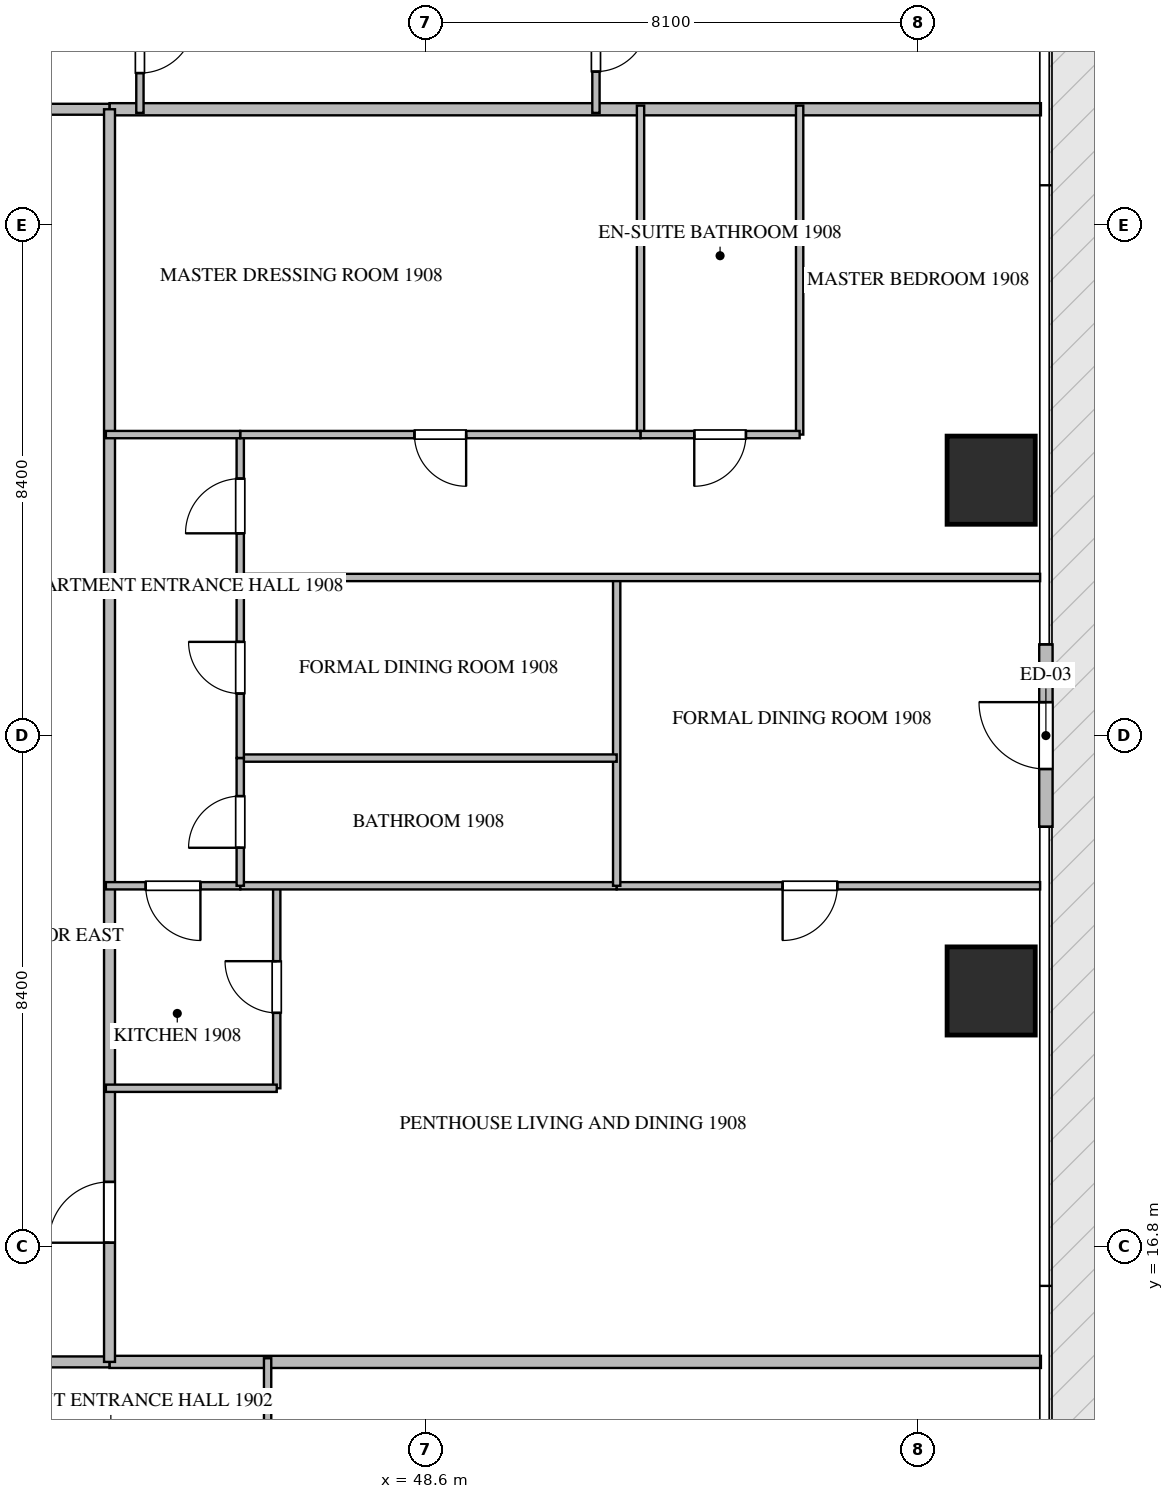
"""IFC4 building model, lengths in metres.
Left out: names, types, materials, properties, quantities, classifications, styles, units other than length and angle.
Written with IfcOpenShell. Run it as: python <this file> out.ifc"""

import sys

from ifc_helpers import new_model, si_unit, direction, frame, frame_2d, origin, origin_2d, place, context, subcontext, project, spatial, rectangle, extrude, source, transform, mapped, element, fill, save


model = new_model("IFC4")
c1 = context("Model", 3, precision=1e-05, world=origin(), true_north=direction((0.0, 1.0)))
c2 = subcontext(c1, "Body", "Model", "MODEL_VIEW")
j1 = project(units=[si_unit("LENGTHUNIT", "METRE"), si_unit("PLANEANGLEUNIT", "RADIAN")], contexts=[c1])
p1 = place(None, origin())
s1 = spatial("IfcSite", under=j1, at=p1, CompositionType="ELEMENT")
p2 = place(p1, origin())
s2 = spatial("IfcBuilding", under=s1, at=p2, CompositionType="ELEMENT")
p3 = place(p2, frame((0.0, 0.0, 79.2)))
s3 = spatial("IfcBuildingStorey", under=s2, at=p3, CompositionType="ELEMENT", Elevation=79.2)
m1 = source(origin(), c2, "Body", "SweptSolid", [
    extrude(rectangle(XDim=1.45, YDim=1.45, at=origin_2d()), origin(), (0.0, 0.0, 1.0), 3.75),
])
for number, where, z_axis, x_axis in (
    (1, (57.9, 21.0, -0.26), (0.0, 0.0, 1.0), (1.0, 0.0, 0.0)),
    (2, (57.9, 29.4, -0.26), (0.0, 0.0, 1.0), (1.0, 0.0, 0.0)),
):
    element("IfcColumn", number, at=place(p3, frame(where, z_axis=z_axis, x_axis=x_axis)), inside=s3, PredefinedType="COLUMN", context=c2, shape_type="MappedRepresentation", body=[
        mapped(m1, transform((0.0, 0.0, 0.0), scale=1.0)),
    ])
p4 = place(p3, frame((58.8, 23.7, 0.0), z_axis=(0.0, 0.0, 1.0), x_axis=(0.0, 1.0, 0.0)))
e3 = element("IfcWall", 3, at=p4, inside=s3, PredefinedType="ELEMENTEDWALL", context=c2, shape_type="SweptSolid", body=[
    extrude(rectangle(XDim=3.0, YDim=0.22, at=frame_2d((1.5, 0.0))), origin(), (0.0, 0.0, 1.0), 3.475),
])
p5 = place(p4, frame((0.95, 0.0, 0.0)))
e4 = element("IfcOpeningElement", 4, at=p5, cuts=e3, PredefinedType="OPENING", context=c2, shape_type="SweptSolid", body=[
    extrude(rectangle(XDim=1.1, YDim=2.2, at=frame_2d((0.55, 1.1))), frame((0.0, 0.12, 0.0), z_axis=(0.0, -1.0, 0.0), x_axis=(1.0, 0.0, 0.0)), (0.0, 0.0, 1.0), 0.24),
])
for number, where, z_axis, x_axis in (
    (5, (43.4, 14.9, 0.0), (0.0, 0.0, 1.0), (1.0, 0.0, 0.0)),
    (6, (43.4, 35.5, 0.0), (0.0, 0.0, 1.0), (1.0, 0.0, 0.0)),
):
    element("IfcWall", number, at=place(p3, frame(where, z_axis=z_axis, x_axis=x_axis)), inside=s3, PredefinedType="PARTITIONING", context=c2, shape_type="SweptSolid", body=[
        extrude(rectangle(XDim=15.318, YDim=0.2, at=frame_2d((7.659, 0.0))), origin(), (0.0, 0.0, 1.0), 3.49),
    ])
p6 = place(p3, frame((21.402, 14.9, 0.0), z_axis=(0.0, 0.0, 1.0), x_axis=(1.0, 0.0, 0.0)))
e7 = element("IfcWall", 7, at=p6, inside=s3, PredefinedType="PARTITIONING", context=c2, shape_type="SweptSolid", body=[
    extrude(rectangle(XDim=21.996, YDim=0.18, at=frame_2d((10.998, 0.0))), origin(), (0.0, 0.0, 1.0), 3.49),
])
p7 = place(p6, frame((4.724, 0.0, 0.0)))
e8 = element("IfcOpeningElement", 8, at=p7, cuts=e7, PredefinedType="OPENING", context=c2, shape_type="SweptSolid", body=[
    extrude(rectangle(XDim=1.0, YDim=2.15, at=frame_2d((0.5, 1.075))), frame((0.0, 0.1, 0.0), z_axis=(0.0, -1.0, 0.0), x_axis=(1.0, 0.0, 0.0)), (0.0, 0.0, 1.0), 0.2),
])
p8 = place(p6, frame((10.498, 0.0, 0.0)))
e9 = element("IfcOpeningElement", 9, at=p8, cuts=e7, PredefinedType="OPENING", context=c2, shape_type="SweptSolid", body=[
    extrude(rectangle(XDim=1.0, YDim=2.15, at=frame_2d((0.5, 1.075))), frame((0.0, 0.1, 0.0), z_axis=(0.0, -1.0, 0.0), x_axis=(1.0, 0.0, 0.0)), (0.0, 0.0, 1.0), 0.2),
])
p9 = place(p3, frame((21.402, 35.5, 0.0), z_axis=(0.0, 0.0, 1.0), x_axis=(1.0, 0.0, 0.0)))
e10 = element("IfcWall", 10, at=p9, inside=s3, PredefinedType="PARTITIONING", context=c2, shape_type="SweptSolid", body=[
    extrude(rectangle(XDim=21.996, YDim=0.18, at=frame_2d((10.998, 0.0))), origin(), (0.0, 0.0, 1.0), 3.49),
])
p10 = place(p9, frame((10.498, 0.0, 0.0)))
e11 = element("IfcOpeningElement", 11, at=p10, cuts=e10, PredefinedType="OPENING", context=c2, shape_type="SweptSolid", body=[
    extrude(rectangle(XDim=1.0, YDim=2.15, at=frame_2d((0.5, 1.075))), frame((0.0, 0.1, 0.0), z_axis=(0.0, -1.0, 0.0), x_axis=(1.0, 0.0, 0.0)), (0.0, 0.0, 1.0), 0.2),
])
p11 = place(p9, frame((16.272, 0.0, 0.0)))
e12 = element("IfcOpeningElement", 12, at=p11, cuts=e10, PredefinedType="OPENING", context=c2, shape_type="SweptSolid", body=[
    extrude(rectangle(XDim=1.0, YDim=2.15, at=frame_2d((0.5, 1.075))), frame((0.0, 0.1, 0.0), z_axis=(0.0, -1.0, 0.0), x_axis=(1.0, 0.0, 0.0)), (0.0, 0.0, 1.0), 0.2),
])
p12 = place(p3, frame((43.4, 14.9, 0.0), z_axis=(0.0, 0.0, 1.0), x_axis=(0.0, 1.0, 0.0)))
e13 = element("IfcWall", 13, at=p12, inside=s3, PredefinedType="PARTITIONING", context=c2, shape_type="SweptSolid", body=[
    extrude(rectangle(XDim=20.6, YDim=0.18, at=frame_2d((10.3, 0.0))), origin(), (0.0, 0.0, 1.0), 3.49),
])
p13 = place(p12, frame((1.96, 0.0, 0.0)))
e14 = element("IfcOpeningElement", 14, at=p13, cuts=e13, PredefinedType="OPENING", context=c2, shape_type="SweptSolid", body=[
    extrude(rectangle(XDim=1.0, YDim=2.15, at=frame_2d((0.5, 1.075))), frame((0.0, 0.1, 0.0), z_axis=(0.0, -1.0, 0.0), x_axis=(1.0, 0.0, 0.0)), (0.0, 0.0, 1.0), 0.2),
])
p14 = place(p3, frame((46.0, 12.752, 0.0), z_axis=(0.0, 0.0, 1.0), x_axis=(0.0, 1.0, 0.0)))
e15 = element("IfcWall", 15, at=p14, inside=s3, PredefinedType="PARTITIONING", context=c2, shape_type="SweptSolid", body=[
    extrude(rectangle(XDim=2.208, YDim=0.12, at=frame_2d((1.104, 0.0))), origin(), (0.0, 0.0, 1.0), 3.49),
])
p15 = place(p3, frame((43.9, 37.65, 0.0), z_axis=(0.0, 0.0, 1.0), x_axis=(0.0, -1.0, 0.0)))
e16 = element("IfcWall", 16, at=p15, inside=s3, PredefinedType="PARTITIONING", context=c2, shape_type="SweptSolid", body=[
    extrude(rectangle(XDim=2.21, YDim=0.12, at=frame_2d((1.105, 0.0))), origin(), (0.0, 0.0, 1.0), 3.49),
])
p16 = place(p15, frame((0.655, 0.0, 0.0)))
e17 = element("IfcOpeningElement", 17, at=p16, cuts=e16, PredefinedType="OPENING", context=c2, shape_type="SweptSolid", body=[
    extrude(rectangle(XDim=0.9, YDim=2.1, at=frame_2d((0.45, 1.05))), frame((0.0, 0.07, 0.0), z_axis=(0.0, -1.0, 0.0), x_axis=(1.0, 0.0, 0.0)), (0.0, 0.0, 1.0), 0.14),
])
p17 = place(p3, frame((51.4, 37.648, 0.0), z_axis=(0.0, 0.0, 1.0), x_axis=(0.0, -1.0, 0.0)))
e18 = element("IfcWall", 18, at=p17, inside=s3, PredefinedType="PARTITIONING", context=c2, shape_type="SweptSolid", body=[
    extrude(rectangle(XDim=2.208, YDim=0.12, at=frame_2d((1.104, 0.0))), origin(), (0.0, 0.0, 1.0), 3.49),
])
p18 = place(p17, frame((0.679, 0.0, 0.0)))
e19 = element("IfcOpeningElement", 19, at=p18, cuts=e18, PredefinedType="OPENING", context=c2, shape_type="SweptSolid", body=[
    extrude(rectangle(XDim=0.85, YDim=2.1, at=frame_2d((0.425, 1.05))), frame((0.0, 0.07, 0.0), z_axis=(0.0, -1.0, 0.0), x_axis=(1.0, 0.0, 0.0)), (0.0, 0.0, 1.0), 0.14),
])
p19 = place(p3, frame((46.15, 19.4, 0.0), z_axis=(0.0, 0.0, 1.0), x_axis=(0.0, 1.0, 0.0)))
e20 = element("IfcWall", 20, at=p19, inside=s3, PredefinedType="PARTITIONING", context=c2, shape_type="SweptSolid", body=[
    extrude(rectangle(XDim=3.33, YDim=0.12, at=frame_2d((1.665, 0.0))), origin(), (0.0, 0.0, 1.0), 3.49),
])
p20 = place(p19, frame((1.24, 0.0, 0.0)))
e21 = element("IfcOpeningElement", 21, at=p20, cuts=e20, PredefinedType="OPENING", context=c2, shape_type="SweptSolid", body=[
    extrude(rectangle(XDim=0.85, YDim=2.1, at=frame_2d((0.425, 1.05))), frame((0.0, 0.07, 0.0), z_axis=(0.0, -1.0, 0.0), x_axis=(1.0, 0.0, 0.0)), (0.0, 0.0, 1.0), 0.14),
])
p21 = place(p3, frame((46.15, 19.4, 0.0), z_axis=(0.0, 0.0, 1.0), x_axis=(-1.0, 0.0, 0.0)))
e22 = element("IfcWall", 22, at=p21, inside=s3, PredefinedType="PARTITIONING", context=c2, shape_type="SweptSolid", body=[
    extrude(rectangle(XDim=2.81, YDim=0.12, at=frame_2d((1.405, 0.0))), origin(), (0.0, 0.0, 1.0), 3.49),
])
p22 = place(p3, frame((45.55, 22.73, 0.0), z_axis=(0.0, 0.0, 1.0), x_axis=(-1.0, 0.0, 0.0)))
e23 = element("IfcWall", 23, at=p22, inside=s3, PredefinedType="PARTITIONING", context=c2, shape_type="SweptSolid", body=[
    extrude(rectangle(XDim=2.21, YDim=0.12, at=frame_2d((1.105, 0.0))), origin(), (0.0, 0.0, 1.0), 3.49),
])
p23 = place(p22, frame((0.655, 0.0, 0.0)))
e24 = element("IfcOpeningElement", 24, at=p23, cuts=e23, PredefinedType="OPENING", context=c2, shape_type="SweptSolid", body=[
    extrude(rectangle(XDim=0.9, YDim=2.1, at=frame_2d((0.45, 1.05))), frame((0.0, 0.07, 0.0), z_axis=(0.0, -1.0, 0.0), x_axis=(1.0, 0.0, 0.0)), (0.0, 0.0, 1.0), 0.14),
])
p24 = place(p3, frame((58.705, 22.73, 0.0), z_axis=(0.0, 0.0, 1.0), x_axis=(-1.0, 0.0, 0.0)))
e25 = element("IfcWall", 25, at=p24, inside=s3, PredefinedType="PARTITIONING", context=c2, shape_type="SweptSolid", body=[
    extrude(rectangle(XDim=6.964, YDim=0.12, at=frame_2d((3.482, 0.0))), origin(), (0.0, 0.0, 1.0), 3.49),
])
p25 = place(p24, frame((3.335, 0.0, 0.0)))
e26 = element("IfcOpeningElement", 26, at=p25, cuts=e25, PredefinedType="OPENING", context=c2, shape_type="SweptSolid", body=[
    extrude(rectangle(XDim=0.9, YDim=2.1, at=frame_2d((0.45, 1.05))), frame((0.0, 0.07, 0.0), z_axis=(0.0, -1.0, 0.0), x_axis=(1.0, 0.0, 0.0)), (0.0, 0.0, 1.0), 0.14),
])
p26 = place(p3, frame((51.739, 22.73, 0.0), z_axis=(0.0, 0.0, 1.0), x_axis=(-1.0, 0.0, 0.0)))
e27 = element("IfcWall", 27, at=p26, inside=s3, PredefinedType="PARTITIONING", context=c2, shape_type="SweptSolid", body=[
    extrude(rectangle(XDim=6.187, YDim=0.12, at=frame_2d((3.094, 0.0))), origin(), (0.0, 0.0, 1.0), 3.49),
])
p27 = place(p3, frame((51.741, 22.73, 0.0), z_axis=(0.0, 0.0, 1.0), x_axis=(0.0, 1.0, 0.0)))
e28 = element("IfcWall", 28, at=p27, inside=s3, PredefinedType="PARTITIONING", context=c2, shape_type="SweptSolid", body=[
    extrude(rectangle(XDim=5.07, YDim=0.12, at=frame_2d((2.535, 0.0))), origin(), (0.0, 0.0, 1.0), 3.49),
])
p28 = place(p3, frame((58.705, 27.8, 0.0), z_axis=(0.0, 0.0, 1.0), x_axis=(-1.0, 0.0, 0.0)))
e29 = element("IfcWall", 29, at=p28, inside=s3, PredefinedType="PARTITIONING", context=c2, shape_type="SweptSolid", body=[
    extrude(rectangle(XDim=13.155, YDim=0.12, at=frame_2d((6.578, 0.0))), origin(), (0.0, 0.0, 1.0), 3.49),
])
p29 = place(p3, frame((51.741, 24.83, 0.0), z_axis=(0.0, 0.0, 1.0), x_axis=(-1.0, 0.0, 0.0)))
e30 = element("IfcWall", 30, at=p29, inside=s3, PredefinedType="PARTITIONING", context=c2, shape_type="SweptSolid", body=[
    extrude(rectangle(XDim=6.191, YDim=0.12, at=frame_2d((3.095, 0.0))), origin(), (0.0, 0.0, 1.0), 3.49),
])
p30 = place(p3, frame((45.55, 22.73, 0.0), z_axis=(0.0, 0.0, 1.0), x_axis=(0.0, 1.0, 0.0)))
e31 = element("IfcWall", 31, at=p30, inside=s3, PredefinedType="PARTITIONING", context=c2, shape_type="SweptSolid", body=[
    extrude(rectangle(XDim=2.1, YDim=0.12, at=frame_2d((1.05, 0.0))), origin(), (0.0, 0.0, 1.0), 3.49),
])
p31 = place(p30, frame((0.625, 0.0, 0.0)))
e32 = element("IfcOpeningElement", 32, at=p31, cuts=e31, PredefinedType="OPENING", context=c2, shape_type="SweptSolid", body=[
    extrude(rectangle(XDim=0.85, YDim=2.1, at=frame_2d((0.425, 1.05))), frame((0.0, 0.07, 0.0), z_axis=(0.0, -1.0, 0.0), x_axis=(1.0, 0.0, 0.0)), (0.0, 0.0, 1.0), 0.14),
])
p32 = place(p3, frame((45.55, 24.832, 0.0), z_axis=(0.0, 0.0, 1.0), x_axis=(0.0, 1.0, 0.0)))
e33 = element("IfcWall", 33, at=p32, inside=s3, PredefinedType="PARTITIONING", context=c2, shape_type="SweptSolid", body=[
    extrude(rectangle(XDim=2.968, YDim=0.12, at=frame_2d((1.484, 0.0))), origin(), (0.0, 0.0, 1.0), 3.49),
])
p33 = place(p32, frame((1.059, 0.0, 0.0)))
e34 = element("IfcOpeningElement", 34, at=p33, cuts=e33, PredefinedType="OPENING", context=c2, shape_type="SweptSolid", body=[
    extrude(rectangle(XDim=0.85, YDim=2.1, at=frame_2d((0.425, 1.05))), frame((0.0, 0.07, 0.0), z_axis=(0.0, -1.0, 0.0), x_axis=(1.0, 0.0, 0.0)), (0.0, 0.0, 1.0), 0.14),
])
p34 = place(p3, frame((45.55, 27.802, 0.0), z_axis=(0.0, 0.0, 1.0), x_axis=(0.0, 1.0, 0.0)))
e35 = element("IfcWall", 35, at=p34, inside=s3, PredefinedType="PARTITIONING", context=c2, shape_type="SweptSolid", body=[
    extrude(rectangle(XDim=2.348, YDim=0.12, at=frame_2d((1.174, 0.0))), origin(), (0.0, 0.0, 1.0), 3.49),
])
p35 = place(p34, frame((0.724, 0.0, 0.0)))
e36 = element("IfcOpeningElement", 36, at=p35, cuts=e35, PredefinedType="OPENING", context=c2, shape_type="SweptSolid", body=[
    extrude(rectangle(XDim=0.9, YDim=2.1, at=frame_2d((0.45, 1.05))), frame((0.0, 0.07, 0.0), z_axis=(0.0, -1.0, 0.0), x_axis=(1.0, 0.0, 0.0)), (0.0, 0.0, 1.0), 0.14),
])
for number, where, z_axis, x_axis in (
    (37, (54.75, 30.15, 0.0), (0.0, 0.0, 1.0), (0.0, 1.0, 0.0)),
    (38, (52.133, 30.15, 0.0), (0.0, 0.0, 1.0), (0.0, 1.0, 0.0)),
):
    element("IfcWall", number, at=place(p3, frame(where, z_axis=z_axis, x_axis=x_axis)), inside=s3, PredefinedType="PARTITIONING", context=c2, shape_type="SweptSolid", body=[
        extrude(rectangle(XDim=5.41, YDim=0.12, at=frame_2d((2.705, 0.0))), origin(), (0.0, 0.0, 1.0), 3.49),
    ])
p36 = place(p3, frame((54.75, 30.15, 0.0), z_axis=(0.0, 0.0, 1.0), x_axis=(-1.0, 0.0, 0.0)))
e39 = element("IfcWall", 39, at=p36, inside=s3, PredefinedType="PARTITIONING", context=c2, shape_type="SweptSolid", body=[
    extrude(rectangle(XDim=2.617, YDim=0.12, at=frame_2d((1.309, 0.0))), origin(), (0.0, 0.0, 1.0), 3.49),
])
p37 = place(p36, frame((0.883, 0.0, 0.0)))
e40 = element("IfcOpeningElement", 40, at=p37, cuts=e39, PredefinedType="OPENING", context=c2, shape_type="SweptSolid", body=[
    extrude(rectangle(XDim=0.85, YDim=2.1, at=frame_2d((0.425, 1.05))), frame((0.0, 0.07, 0.0), z_axis=(0.0, -1.0, 0.0), x_axis=(1.0, 0.0, 0.0)), (0.0, 0.0, 1.0), 0.14),
])
p38 = place(p3, frame((52.131, 30.15, 0.0), z_axis=(0.0, 0.0, 1.0), x_axis=(-1.0, 0.0, 0.0)))
e41 = element("IfcWall", 41, at=p38, inside=s3, PredefinedType="PARTITIONING", context=c2, shape_type="SweptSolid", body=[
    extrude(rectangle(XDim=6.581, YDim=0.12, at=frame_2d((3.291, 0.0))), origin(), (0.0, 0.0, 1.0), 3.49),
])
p39 = place(p38, frame((2.866, 0.0, 0.0)))
e42 = element("IfcOpeningElement", 42, at=p39, cuts=e41, PredefinedType="OPENING", context=c2, shape_type="SweptSolid", body=[
    extrude(rectangle(XDim=0.85, YDim=2.1, at=frame_2d((0.425, 1.05))), frame((0.0, 0.07, 0.0), z_axis=(0.0, -1.0, 0.0), x_axis=(1.0, 0.0, 0.0)), (0.0, 0.0, 1.0), 0.14),
])
p40 = place(p3, frame((45.548, 30.15, 0.0), z_axis=(0.0, 0.0, 1.0), x_axis=(-1.0, 0.0, 0.0)))
e43 = element("IfcWall", 43, at=p40, inside=s3, PredefinedType="PARTITIONING", context=c2, shape_type="SweptSolid", body=[
    extrude(rectangle(XDim=2.208, YDim=0.12, at=frame_2d((1.104, 0.0))), origin(), (0.0, 0.0, 1.0), 3.49),
])
m2 = source(origin(), c2, "Body", "SweptSolid", [
    extrude(rectangle(XDim=1.1, YDim=2.2, at=frame_2d((0.55, 1.1))), frame((0.0, 0.025, 0.0), z_axis=(0.0, -1.0, 0.0), x_axis=(1.0, 0.0, 0.0)), (0.0, 0.0, 1.0), 0.05),
])
p41 = place(p5, origin())
e44 = element("IfcDoor", 44, at=p41, inside=s3, OperationType="SINGLE_SWING_RIGHT", PredefinedType="DOOR", context=c2, shape_type="MappedRepresentation", body=[
    mapped(m2, transform((0.0, 0.0, 0.0), scale=1.0)),
])
fill(e4, e44)
m3 = source(origin(), c2, "Body", "SweptSolid", [
    extrude(rectangle(XDim=1.0, YDim=2.15, at=frame_2d((0.5, 1.075))), frame((0.0, 0.025, 0.0), z_axis=(0.0, -1.0, 0.0), x_axis=(1.0, 0.0, 0.0)), (0.0, 0.0, 1.0), 0.05),
])
p42 = place(p13, origin())
e45 = element("IfcDoor", 45, at=p42, inside=s3, OperationType="SINGLE_SWING_LEFT", PredefinedType="DOOR", context=c2, shape_type="MappedRepresentation", body=[
    mapped(m3, transform((0.0, 0.0, 0.0), scale=1.0)),
])
fill(e14, e45)
m4 = source(origin(), c2, "Body", "SweptSolid", [
    extrude(rectangle(XDim=0.9, YDim=2.1, at=frame_2d((0.45, 1.05))), frame((0.0, 0.025, 0.0), z_axis=(0.0, -1.0, 0.0), x_axis=(1.0, 0.0, 0.0)), (0.0, 0.0, 1.0), 0.05),
])
p43 = place(p16, origin())
e46 = element("IfcDoor", 46, at=p43, inside=s3, OperationType="SINGLE_SWING_LEFT", PredefinedType="DOOR", context=c2, shape_type="MappedRepresentation", body=[
    mapped(m4, transform((0.0, 0.0, 0.0), scale=1.0)),
])
fill(e17, e46)
m5 = source(origin(), c2, "Body", "SweptSolid", [
    extrude(rectangle(XDim=0.85, YDim=2.1, at=frame_2d((0.425, 1.05))), frame((0.0, 0.025, 0.0), z_axis=(0.0, -1.0, 0.0), x_axis=(1.0, 0.0, 0.0)), (0.0, 0.0, 1.0), 0.05),
])
p44 = place(p18, origin())
e47 = element("IfcDoor", 47, at=p44, inside=s3, OperationType="SINGLE_SWING_LEFT", PredefinedType="DOOR", context=c2, shape_type="MappedRepresentation", body=[
    mapped(m5, transform((0.0, 0.0, 0.0), scale=1.0)),
])
fill(e19, e47)
p45 = place(p20, origin())
e48 = element("IfcDoor", 48, at=p45, inside=s3, OperationType="SINGLE_SWING_RIGHT", PredefinedType="DOOR", context=c2, shape_type="MappedRepresentation", body=[
    mapped(m5, transform((0.0, 0.0, 0.0), scale=1.0)),
])
fill(e21, e48)
p46 = place(p23, origin())
e49 = element("IfcDoor", 49, at=p46, inside=s3, OperationType="SINGLE_SWING_LEFT", PredefinedType="DOOR", context=c2, shape_type="MappedRepresentation", body=[
    mapped(m4, transform((0.0, 0.0, 0.0), scale=1.0)),
])
fill(e24, e49)
p47 = place(p25, origin())
e50 = element("IfcDoor", 50, at=p47, inside=s3, OperationType="SINGLE_SWING_RIGHT", PredefinedType="DOOR", context=c2, shape_type="MappedRepresentation", body=[
    mapped(m4, transform((0.0, 0.0, 0.0), scale=1.0)),
])
fill(e26, e50)
p48 = place(p31, origin())
e51 = element("IfcDoor", 51, at=p48, inside=s3, OperationType="SINGLE_SWING_LEFT", PredefinedType="DOOR", context=c2, shape_type="MappedRepresentation", body=[
    mapped(m5, transform((0.0, 0.0, 0.0), scale=1.0)),
])
fill(e32, e51)
p49 = place(p33, origin())
e52 = element("IfcDoor", 52, at=p49, inside=s3, OperationType="SINGLE_SWING_RIGHT", PredefinedType="DOOR", context=c2, shape_type="MappedRepresentation", body=[
    mapped(m5, transform((0.0, 0.0, 0.0), scale=1.0)),
])
fill(e34, e52)
p50 = place(p35, origin())
e53 = element("IfcDoor", 53, at=p50, inside=s3, OperationType="SINGLE_SWING_LEFT", PredefinedType="DOOR", context=c2, shape_type="MappedRepresentation", body=[
    mapped(m4, transform((0.0, 0.0, 0.0), scale=1.0)),
])
fill(e36, e53)
p51 = place(p37, origin())
e54 = element("IfcDoor", 54, at=p51, inside=s3, OperationType="SINGLE_SWING_RIGHT", PredefinedType="DOOR", context=c2, shape_type="MappedRepresentation", body=[
    mapped(m5, transform((0.0, 0.0, 0.0), scale=1.0)),
])
fill(e40, e54)
p52 = place(p39, origin())
e55 = element("IfcDoor", 55, at=p52, inside=s3, OperationType="SINGLE_SWING_LEFT", PredefinedType="DOOR", context=c2, shape_type="MappedRepresentation", body=[
    mapped(m5, transform((0.0, 0.0, 0.0), scale=1.0)),
])
fill(e42, e55)
save(model, sys.argv[1])
